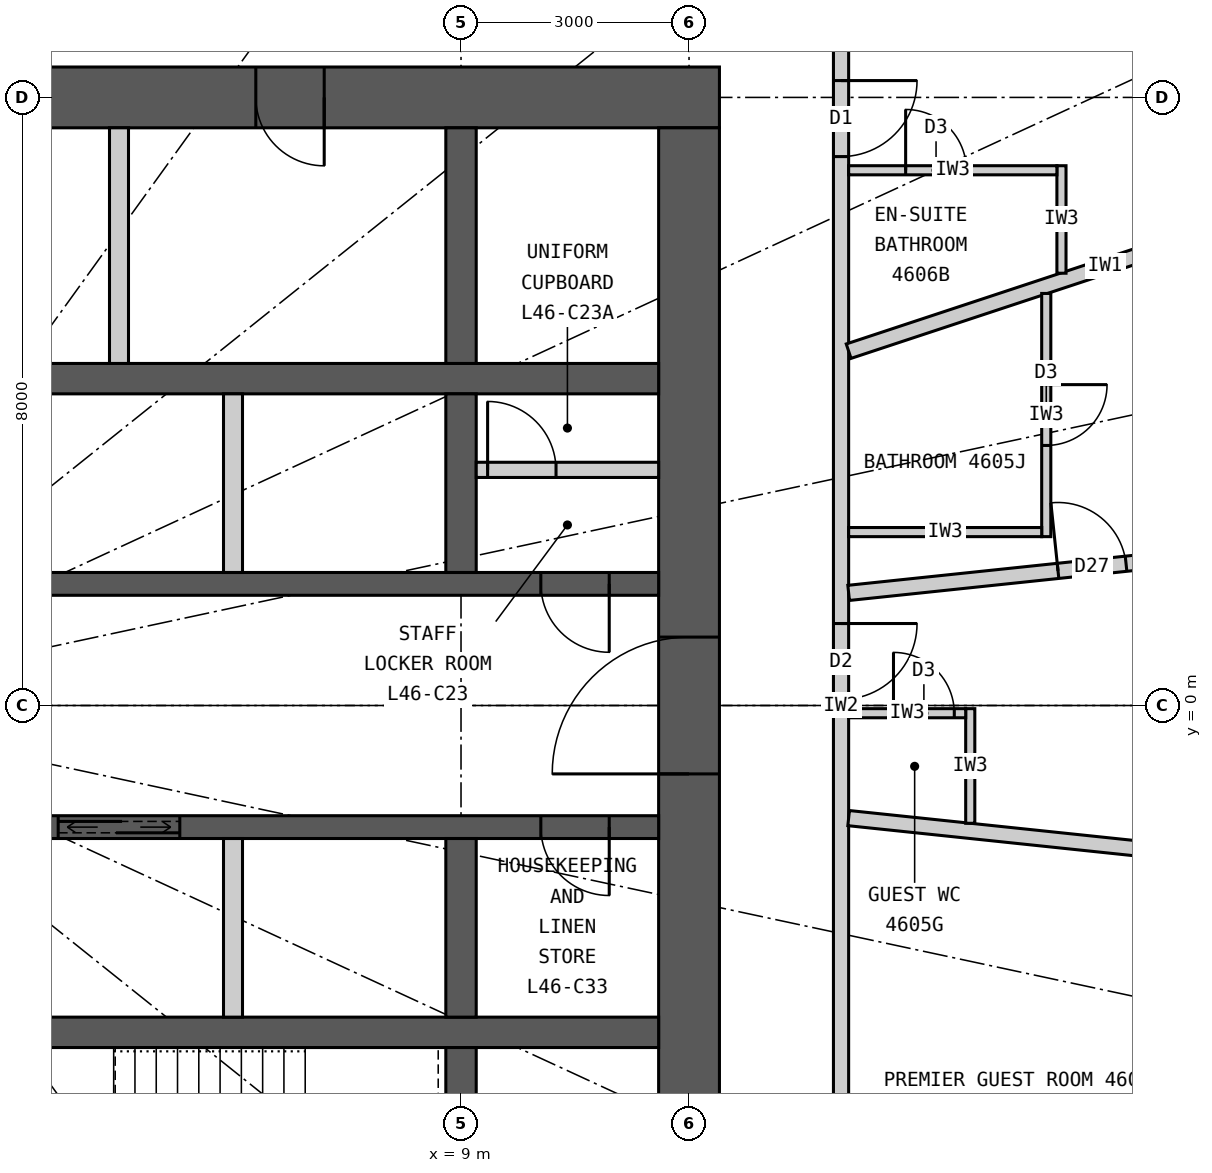
"""IFC4 building model, lengths in metres.
Left out: names, types, materials, properties, quantities, classifications, styles, units other than length and angle.
Written with IfcOpenShell. Run it as: python <this file> out.ifc"""

import sys

from ifc_helpers import new_model, si_unit, direction, frame, frame_2d, origin, place, context, subcontext, project, spatial, rectangle, extrude, element, fill, save


model = new_model("IFC4")
c1 = context("Model", 3, precision=1e-05, world=origin(), true_north=direction((0.0, 1.0)))
c2 = subcontext(c1, "Body", "Model", "MODEL_VIEW")
j1 = project(units=[si_unit("LENGTHUNIT", "METRE"), si_unit("PLANEANGLEUNIT", "RADIAN")], contexts=[c1])
p1 = place(None, origin())
s1 = spatial("IfcSite", under=j1, at=p1, CompositionType="ELEMENT")
p2 = place(p1, origin())
s2 = spatial("IfcBuilding", under=s1, at=p2, CompositionType="ELEMENT")
p3 = place(p2, frame((0.0, 0.0, 173.1)))
s3 = spatial("IfcBuildingStorey", under=s2, at=p3, CompositionType="ELEMENT", Elevation=173.1)
p4 = place(p3, frame((-12.4, 8.0, 0.0), z_axis=(0.0, 0.0, 1.0), x_axis=(1.0, 0.0, 0.0)))
e1 = element("IfcWall", 1, at=p4, inside=s3, PredefinedType="SHEAR", context=c2, shape_type="SweptSolid", body=[
    extrude(rectangle(XDim=24.8, YDim=0.8, at=frame_2d((12.4, 0.0))), origin(), (0.0, 0.0, 1.0), 3.3),
])
p5 = place(p4, frame((11.1, 0.0, 0.0)))
e2 = element("IfcOpeningElement", 2, at=p5, cuts=e1, PredefinedType="OPENING", context=c2, shape_type="SweptSolid", body=[
    extrude(rectangle(XDim=1.2, YDim=2.2, at=frame_2d((0.6, 1.1))), frame((0.0, 0.41, 0.0), z_axis=(0.0, -1.0, 0.0), x_axis=(1.0, 0.0, 0.0)), (0.0, 0.0, 1.0), 0.82),
])
p6 = place(p4, frame((18.7, 0.0, 0.0)))
e3 = element("IfcOpeningElement", 3, at=p6, cuts=e1, PredefinedType="OPENING", context=c2, shape_type="SweptSolid", body=[
    extrude(rectangle(XDim=0.9, YDim=2.2, at=frame_2d((0.45, 1.1))), frame((0.0, 0.41, 0.0), z_axis=(0.0, -1.0, 0.0), x_axis=(1.0, 0.0, 0.0)), (0.0, 0.0, 1.0), 0.82),
])
p7 = place(p3, frame((12.0, -7.6, 0.0), z_axis=(0.0, 0.0, 1.0), x_axis=(0.0, 1.0, 0.0)))
e4 = element("IfcWall", 4, at=p7, inside=s3, PredefinedType="SHEAR", context=c2, shape_type="SweptSolid", body=[
    extrude(rectangle(XDim=15.2, YDim=0.8, at=frame_2d((7.6, 0.0))), origin(), (0.0, 0.0, 1.0), 3.3),
])
p8 = place(p7, frame((6.7, 0.0, 0.0)))
e5 = element("IfcOpeningElement", 5, at=p8, cuts=e4, PredefinedType="OPENING", context=c2, shape_type="SweptSolid", body=[
    extrude(rectangle(XDim=1.8, YDim=2.2, at=frame_2d((0.9, 1.1))), frame((0.0, 0.41, 0.0), z_axis=(0.0, -1.0, 0.0), x_axis=(1.0, 0.0, 0.0)), (0.0, 0.0, 1.0), 0.82),
])
p9 = place(p3, frame((-11.6, 4.3, 0.0), z_axis=(0.0, 0.0, 1.0), x_axis=(1.0, 0.0, 0.0)))
e6 = element("IfcWall", 6, at=p9, inside=s3, PredefinedType="SHEAR", context=c2, shape_type="SweptSolid", body=[
    extrude(rectangle(XDim=23.2, YDim=0.4, at=frame_2d((11.6, 0.0))), origin(), (0.0, 0.0, 1.0), 3.3),
])
p10 = place(p3, frame((-11.6, 1.6, 0.0), z_axis=(0.0, 0.0, 1.0), x_axis=(1.0, 0.0, 0.0)))
e7 = element("IfcWall", 7, at=p10, inside=s3, PredefinedType="SHEAR", context=c2, shape_type="SweptSolid", body=[
    extrude(rectangle(XDim=23.2, YDim=0.3, at=frame_2d((11.6, 0.0))), origin(), (0.0, 0.0, 1.0), 3.3),
])
p11 = place(p10, frame((9.55, 0.0, 0.0)))
e8 = element("IfcOpeningElement", 8, at=p11, cuts=e7, PredefinedType="OPENING", context=c2, shape_type="SweptSolid", body=[
    extrude(rectangle(XDim=1.1, YDim=2.2, at=frame_2d((0.55, 1.1))), frame((0.0, 0.16, 0.0), z_axis=(0.0, -1.0, 0.0), x_axis=(1.0, 0.0, 0.0)), (0.0, 0.0, 1.0), 0.32),
])
p12 = place(p10, frame((12.55, 0.0, 0.0)))
e9 = element("IfcOpeningElement", 9, at=p12, cuts=e7, PredefinedType="OPENING", context=c2, shape_type="SweptSolid", body=[
    extrude(rectangle(XDim=1.1, YDim=2.2, at=frame_2d((0.55, 1.1))), frame((0.0, 0.16, 0.0), z_axis=(0.0, -1.0, 0.0), x_axis=(1.0, 0.0, 0.0)), (0.0, 0.0, 1.0), 0.32),
])
p13 = place(p10, frame((0.65, 0.0, 0.0)))
e10 = element("IfcOpeningElement", 10, at=p13, cuts=e7, PredefinedType="OPENING", context=c2, shape_type="SweptSolid", body=[
    extrude(rectangle(XDim=0.9, YDim=2.2, at=frame_2d((0.45, 1.1))), frame((0.0, 0.16, 0.0), z_axis=(0.0, -1.0, 0.0), x_axis=(1.0, 0.0, 0.0)), (0.0, 0.0, 1.0), 0.32),
])
p14 = place(p10, frame((5.15, 0.0, 0.0)))
e11 = element("IfcOpeningElement", 11, at=p14, cuts=e7, PredefinedType="OPENING", context=c2, shape_type="SweptSolid", body=[
    extrude(rectangle(XDim=0.9, YDim=2.2, at=frame_2d((0.45, 1.1))), frame((0.0, 0.16, 0.0), z_axis=(0.0, -1.0, 0.0), x_axis=(1.0, 0.0, 0.0)), (0.0, 0.0, 1.0), 0.32),
])
p15 = place(p10, frame((21.65, 0.0, 0.0)))
e12 = element("IfcOpeningElement", 12, at=p15, cuts=e7, PredefinedType="OPENING", context=c2, shape_type="SweptSolid", body=[
    extrude(rectangle(XDim=0.9, YDim=2.2, at=frame_2d((0.45, 1.1))), frame((0.0, 0.16, 0.0), z_axis=(0.0, -1.0, 0.0), x_axis=(1.0, 0.0, 0.0)), (0.0, 0.0, 1.0), 0.32),
])
p16 = place(p3, frame((-11.6, -4.3, 0.0), z_axis=(0.0, 0.0, 1.0), x_axis=(1.0, 0.0, 0.0)))
e13 = element("IfcWall", 13, at=p16, inside=s3, PredefinedType="SHEAR", context=c2, shape_type="SweptSolid", body=[
    extrude(rectangle(XDim=23.2, YDim=0.4, at=frame_2d((11.6, 0.0))), origin(), (0.0, 0.0, 1.0), 3.3),
])
p17 = place(p3, frame((-11.6, -1.6, 0.0), z_axis=(0.0, 0.0, 1.0), x_axis=(1.0, 0.0, 0.0)))
e14 = element("IfcWall", 14, at=p17, inside=s3, PredefinedType="SHEAR", context=c2, shape_type="SweptSolid", body=[
    extrude(rectangle(XDim=23.2, YDim=0.3, at=frame_2d((11.6, 0.0))), origin(), (0.0, 0.0, 1.0), 3.3),
])
p18 = place(p17, frame((9.55, 0.0, 0.0)))
e15 = element("IfcOpeningElement", 15, at=p18, cuts=e14, PredefinedType="OPENING", context=c2, shape_type="SweptSolid", body=[
    extrude(rectangle(XDim=1.1, YDim=2.2, at=frame_2d((0.55, 1.1))), frame((0.0, 0.16, 0.0), z_axis=(0.0, -1.0, 0.0), x_axis=(1.0, 0.0, 0.0)), (0.0, 0.0, 1.0), 0.32),
])
p19 = place(p17, frame((15.3, 0.0, 0.0)))
e16 = element("IfcOpeningElement", 16, at=p19, cuts=e14, PredefinedType="OPENING", context=c2, shape_type="SweptSolid", body=[
    extrude(rectangle(XDim=1.6, YDim=2.4, at=frame_2d((0.8, 1.2))), frame((0.0, 0.16, 0.0), z_axis=(0.0, -1.0, 0.0), x_axis=(1.0, 0.0, 0.0)), (0.0, 0.0, 1.0), 0.32),
])
p20 = place(p17, frame((0.65, 0.0, 0.0)))
e17 = element("IfcOpeningElement", 17, at=p20, cuts=e14, PredefinedType="OPENING", context=c2, shape_type="SweptSolid", body=[
    extrude(rectangle(XDim=0.9, YDim=2.2, at=frame_2d((0.45, 1.1))), frame((0.0, 0.16, 0.0), z_axis=(0.0, -1.0, 0.0), x_axis=(1.0, 0.0, 0.0)), (0.0, 0.0, 1.0), 0.32),
])
p21 = place(p17, frame((5.15, 0.0, 0.0)))
e18 = element("IfcOpeningElement", 18, at=p21, cuts=e14, PredefinedType="OPENING", context=c2, shape_type="SweptSolid", body=[
    extrude(rectangle(XDim=0.9, YDim=2.2, at=frame_2d((0.45, 1.1))), frame((0.0, 0.16, 0.0), z_axis=(0.0, -1.0, 0.0), x_axis=(1.0, 0.0, 0.0)), (0.0, 0.0, 1.0), 0.32),
])
p22 = place(p17, frame((21.65, 0.0, 0.0)))
e19 = element("IfcOpeningElement", 19, at=p22, cuts=e14, PredefinedType="OPENING", context=c2, shape_type="SweptSolid", body=[
    extrude(rectangle(XDim=0.9, YDim=2.2, at=frame_2d((0.45, 1.1))), frame((0.0, 0.16, 0.0), z_axis=(0.0, -1.0, 0.0), x_axis=(1.0, 0.0, 0.0)), (0.0, 0.0, 1.0), 0.32),
])
p23 = place(p3, frame((9.0, 4.5, 0.0), z_axis=(0.0, 0.0, 1.0), x_axis=(0.0, 1.0, 0.0)))
e20 = element("IfcWall", 20, at=p23, inside=s3, PredefinedType="SHEAR", context=c2, shape_type="SweptSolid", body=[
    extrude(rectangle(XDim=3.1, YDim=0.4, at=frame_2d((1.55, 0.0))), origin(), (0.0, 0.0, 1.0), 3.3),
])
for number, where, z_axis, x_axis in (
    (21, (9.0, 1.75, 0.0), (0.0, 0.0, 1.0), (0.0, 1.0, 0.0)),
    (22, (9.0, -4.1, 0.0), (0.0, 0.0, 1.0), (0.0, 1.0, 0.0)),
):
    element("IfcWall", number, at=place(p3, frame(where, z_axis=z_axis, x_axis=x_axis)), inside=s3, PredefinedType="SHEAR", context=c2, shape_type="SweptSolid", body=[
        extrude(rectangle(XDim=2.35, YDim=0.4, at=frame_2d((1.175, 0.0))), origin(), (0.0, 0.0, 1.0), 3.3),
    ])
p24 = place(p3, frame((9.0, -7.6, 0.0), z_axis=(0.0, 0.0, 1.0), x_axis=(0.0, 1.0, 0.0)))
e23 = element("IfcWall", 23, at=p24, inside=s3, PredefinedType="SHEAR", context=c2, shape_type="SweptSolid", body=[
    extrude(rectangle(XDim=3.1, YDim=0.4, at=frame_2d((1.55, 0.0))), origin(), (0.0, 0.0, 1.0), 3.3),
])
p25 = place(p3, frame((4.5, 4.5, 0.0), z_axis=(0.0, 0.0, 1.0), x_axis=(0.0, 1.0, 0.0)))
e24 = element("IfcWall", 24, at=p25, inside=s3, PredefinedType="PARTITIONING", context=c2, shape_type="SweptSolid", body=[
    extrude(rectangle(XDim=3.1, YDim=0.25, at=frame_2d((1.55, 0.0))), origin(), (0.0, 0.0, 1.0), 3.3),
])
for number, where, z_axis, x_axis in (
    (25, (6.0, 1.75, 0.0), (0.0, 0.0, 1.0), (0.0, 1.0, 0.0)),
    (26, (6.0, -4.1, 0.0), (0.0, 0.0, 1.0), (0.0, 1.0, 0.0)),
):
    element("IfcWall", number, at=place(p3, frame(where, z_axis=z_axis, x_axis=x_axis)), inside=s3, PredefinedType="PARTITIONING", context=c2, shape_type="SweptSolid", body=[
        extrude(rectangle(XDim=2.35, YDim=0.25, at=frame_2d((1.175, 0.0))), origin(), (0.0, 0.0, 1.0), 3.3),
    ])
p26 = place(p3, frame((14.0, -9.9, 0.0), z_axis=(0.0, 0.0, 1.0), x_axis=(0.0, 1.0, 0.0)))
e27 = element("IfcWall", 27, at=p26, inside=s3, PredefinedType="PARTITIONING", context=c2, shape_type="SweptSolid", body=[
    extrude(rectangle(XDim=19.8, YDim=0.2, at=frame_2d((9.9, 0.0))), origin(), (0.0, 0.0, 1.0), 3.12),
])
p27 = place(p26, frame((3.688, 0.0, 0.0)))
e28 = element("IfcOpeningElement", 28, at=p27, cuts=e27, PredefinedType="OPENING", context=c2, shape_type="SweptSolid", body=[
    extrude(rectangle(XDim=1.0, YDim=2.2, at=frame_2d((0.5, 1.1))), frame((0.0, 0.11, 0.0), z_axis=(0.0, -1.0, 0.0), x_axis=(1.0, 0.0, 0.0)), (0.0, 0.0, 1.0), 0.22),
])
p28 = place(p26, frame((9.979, 0.0, 0.0)))
e29 = element("IfcOpeningElement", 29, at=p28, cuts=e27, PredefinedType="OPENING", context=c2, shape_type="SweptSolid", body=[
    extrude(rectangle(XDim=1.0, YDim=2.2, at=frame_2d((0.5, 1.1))), frame((0.0, 0.11, 0.0), z_axis=(0.0, -1.0, 0.0), x_axis=(1.0, 0.0, 0.0)), (0.0, 0.0, 1.0), 0.22),
])
p29 = place(p26, frame((17.122, 0.0, 0.0)))
e30 = element("IfcOpeningElement", 30, at=p29, cuts=e27, PredefinedType="OPENING", context=c2, shape_type="SweptSolid", body=[
    extrude(rectangle(XDim=1.0, YDim=2.2, at=frame_2d((0.5, 1.1))), frame((0.0, 0.11, 0.0), z_axis=(0.0, -1.0, 0.0), x_axis=(1.0, 0.0, 0.0)), (0.0, 0.0, 1.0), 0.22),
])
p30 = place(p3, frame((14.1, 1.481, 0.0), z_axis=(0.0, 0.0, 1.0), x_axis=(0.994524794819, 0.104500873159, 0.0)))
e31 = element("IfcWall", 31, at=p30, inside=s3, PredefinedType="PARTITIONING", context=c2, shape_type="SweptSolid", body=[
    extrude(rectangle(XDim=8.362, YDim=0.2, at=frame_2d((4.181, 0.0))), origin(), (0.0, 0.0, 1.0), 2.47),
])
p31 = place(p30, frame((2.77, 0.0, 0.0)))
e32 = element("IfcOpeningElement", 32, at=p31, cuts=e31, PredefinedType="OPENING", context=c2, shape_type="SweptSolid", body=[
    extrude(rectangle(XDim=0.9, YDim=2.1, at=frame_2d((0.45, 1.05))), frame((0.0, 0.11, 0.0), z_axis=(0.0, -1.0, 0.0), x_axis=(1.0, 0.0, 0.0)), (0.0, 0.0, 1.0), 0.22),
])
p32 = place(p3, frame((14.1, 4.661, 0.0), z_axis=(0.0, 0.0, 1.0), x_axis=(0.949453216399, 0.313908569285, 0.0)))
e33 = element("IfcWall", 33, at=p32, inside=s3, PredefinedType="PARTITIONING", context=c2, shape_type="SweptSolid", body=[
    extrude(rectangle(XDim=7.109, YDim=0.2, at=frame_2d((3.554, 0.0))), origin(), (0.0, 0.0, 1.0), 3.12),
])
p33 = place(p3, frame((14.1, -1.481, 0.0), z_axis=(0.0, 0.0, 1.0), x_axis=(0.994524794819, -0.104500873159, 0.0)))
e34 = element("IfcWall", 34, at=p33, inside=s3, PredefinedType="PARTITIONING", context=c2, shape_type="SweptSolid", body=[
    extrude(rectangle(XDim=8.362, YDim=0.2, at=frame_2d((4.181, 0.0))), origin(), (0.0, 0.0, 1.0), 2.47),
])
p34 = place(p3, frame((15.7, -1.55, 0.0), z_axis=(0.0, 0.0, 1.0), x_axis=(0.0, 1.0, 0.0)))
e35 = element("IfcWall", 35, at=p34, inside=s3, PredefinedType="PARTITIONING", context=c2, shape_type="SweptSolid", body=[
    extrude(rectangle(XDim=1.508, YDim=0.12, at=frame_2d((0.754, 0.0))), origin(), (0.0, 0.0, 1.0), 3.12),
])
p35 = place(p3, frame((14.1, -0.102, 0.0), z_axis=(0.0, 0.0, 1.0), x_axis=(1.0, 0.0, 0.0)))
e36 = element("IfcWall", 36, at=p35, inside=s3, PredefinedType="PARTITIONING", context=c2, shape_type="SweptSolid", body=[
    extrude(rectangle(XDim=1.54, YDim=0.12, at=frame_2d((0.77, 0.0))), origin(), (0.0, 0.0, 1.0), 2.42),
])
p36 = place(p35, frame((0.59, 0.0, 0.0)))
e37 = element("IfcOpeningElement", 37, at=p36, cuts=e36, PredefinedType="OPENING", context=c2, shape_type="SweptSolid", body=[
    extrude(rectangle(XDim=0.8, YDim=2.1, at=frame_2d((0.4, 1.05))), frame((0.0, 0.07, 0.0), z_axis=(0.0, -1.0, 0.0), x_axis=(1.0, 0.0, 0.0)), (0.0, 0.0, 1.0), 0.14),
])
p37 = place(p3, frame((16.7, 5.421, 0.0), z_axis=(0.0, 0.0, 1.0), x_axis=(0.0, -1.0, 0.0)))
e38 = element("IfcWall", 38, at=p37, inside=s3, PredefinedType="PARTITIONING", context=c2, shape_type="SweptSolid", body=[
    extrude(rectangle(XDim=3.2, YDim=0.12, at=frame_2d((1.6, 0.0))), origin(), (0.0, 0.0, 1.0), 3.12),
])
p38 = place(p37, frame((1.2, 0.0, 0.0)))
e39 = element("IfcOpeningElement", 39, at=p38, cuts=e38, PredefinedType="OPENING", context=c2, shape_type="SweptSolid", body=[
    extrude(rectangle(XDim=0.8, YDim=2.1, at=frame_2d((0.4, 1.05))), frame((0.0, 0.07, 0.0), z_axis=(0.0, -1.0, 0.0), x_axis=(1.0, 0.0, 0.0)), (0.0, 0.0, 1.0), 0.14),
])
p39 = place(p3, frame((14.1, 2.281, 0.0), z_axis=(0.0, 0.0, 1.0), x_axis=(1.0, 0.0, 0.0)))
e40 = element("IfcWall", 40, at=p39, inside=s3, PredefinedType="PARTITIONING", context=c2, shape_type="SweptSolid", body=[
    extrude(rectangle(XDim=2.54, YDim=0.12, at=frame_2d((1.27, 0.0))), origin(), (0.0, 0.0, 1.0), 3.12),
])
p40 = place(p3, frame((16.9, 5.687, 0.0), z_axis=(0.0, 0.0, 1.0), x_axis=(0.0, 1.0, 0.0)))
e41 = element("IfcWall", 41, at=p40, inside=s3, PredefinedType="PARTITIONING", context=c2, shape_type="SweptSolid", body=[
    extrude(rectangle(XDim=1.414, YDim=0.12, at=frame_2d((0.707, 0.0))), origin(), (0.0, 0.0, 1.0), 3.12),
])
p41 = place(p3, frame((14.1, 7.042, 0.0), z_axis=(0.0, 0.0, 1.0), x_axis=(1.0, 0.0, 0.0)))
e42 = element("IfcWall", 42, at=p41, inside=s3, PredefinedType="PARTITIONING", context=c2, shape_type="SweptSolid", body=[
    extrude(rectangle(XDim=2.74, YDim=0.12, at=frame_2d((1.37, 0.0))), origin(), (0.0, 0.0, 1.0), 3.12),
])
p42 = place(p41, frame((0.75, 0.0, 0.0)))
e43 = element("IfcOpeningElement", 43, at=p42, cuts=e42, PredefinedType="OPENING", context=c2, shape_type="SweptSolid", body=[
    extrude(rectangle(XDim=0.8, YDim=2.1, at=frame_2d((0.4, 1.05))), frame((0.0, 0.07, 0.0), z_axis=(0.0, -1.0, 0.0), x_axis=(1.0, 0.0, 0.0)), (0.0, 0.0, 1.0), 0.14),
])
p43 = place(p3, frame((9.2, 3.1, 0.0), z_axis=(0.0, 0.0, 1.0), x_axis=(1.0, 0.0, 0.0)))
e44 = element("IfcWall", 44, at=p43, inside=s3, PredefinedType="PARTITIONING", context=c2, shape_type="SweptSolid", body=[
    extrude(rectangle(XDim=2.4, YDim=0.2, at=frame_2d((1.2, 0.0))), origin(), (0.0, 0.0, 1.0), 3.12),
])
p44 = place(p43, frame((0.15, 0.0, 0.0)))
e45 = element("IfcOpeningElement", 45, at=p44, cuts=e44, PredefinedType="OPENING", context=c2, shape_type="SweptSolid", body=[
    extrude(rectangle(XDim=0.9, YDim=2.2, at=frame_2d((0.45, 1.1))), frame((0.0, 0.11, 0.0), z_axis=(0.0, -1.0, 0.0), x_axis=(1.0, 0.0, 0.0)), (0.0, 0.0, 1.0), 0.22),
])
p45 = place(p36, origin())
e46 = element("IfcDoor", 46, at=p45, inside=s3, OperationType="SINGLE_SWING_LEFT", PredefinedType="DOOR", context=c2, shape_type="SweptSolid", body=[
    extrude(rectangle(XDim=0.8, YDim=2.1, at=frame_2d((0.4, 1.05))), frame((0.0, 0.025, 0.0), z_axis=(0.0, -1.0, 0.0), x_axis=(1.0, 0.0, 0.0)), (0.0, 0.0, 1.0), 0.05),
])
fill(e37, e46)
p46 = place(p28, origin())
e47 = element("IfcDoor", 47, at=p46, inside=s3, OperationType="SINGLE_SWING_RIGHT", PredefinedType="DOOR", context=c2, shape_type="SweptSolid", body=[
    extrude(rectangle(XDim=1.0, YDim=2.2, at=frame_2d((0.5, 1.1))), frame((0.0, 0.025, 0.0), z_axis=(0.0, -1.0, 0.0), x_axis=(1.0, 0.0, 0.0)), (0.0, 0.0, 1.0), 0.05),
])
fill(e29, e47)
p47 = place(p38, origin())
e48 = element("IfcDoor", 48, at=p47, inside=s3, OperationType="SINGLE_SWING_LEFT", PredefinedType="DOOR", context=c2, shape_type="SweptSolid", body=[
    extrude(rectangle(XDim=0.8, YDim=2.1, at=frame_2d((0.4, 1.05))), frame((0.0, 0.025, 0.0), z_axis=(0.0, -1.0, 0.0), x_axis=(1.0, 0.0, 0.0)), (0.0, 0.0, 1.0), 0.05),
])
fill(e39, e48)
p48 = place(p31, origin())
e49 = element("IfcDoor", 49, at=p48, inside=s3, OperationType="SINGLE_SWING_LEFT", PredefinedType="DOOR", context=c2, shape_type="SweptSolid", body=[
    extrude(rectangle(XDim=0.9, YDim=2.1, at=frame_2d((0.45, 1.05))), frame((0.0, 0.025, 0.0), z_axis=(0.0, -1.0, 0.0), x_axis=(1.0, 0.0, 0.0)), (0.0, 0.0, 1.0), 0.05),
])
fill(e32, e49)
p49 = place(p42, origin())
e50 = element("IfcDoor", 50, at=p49, inside=s3, OperationType="SINGLE_SWING_LEFT", PredefinedType="DOOR", context=c2, shape_type="SweptSolid", body=[
    extrude(rectangle(XDim=0.8, YDim=2.1, at=frame_2d((0.4, 1.05))), frame((0.0, 0.025, 0.0), z_axis=(0.0, -1.0, 0.0), x_axis=(1.0, 0.0, 0.0)), (0.0, 0.0, 1.0), 0.05),
])
fill(e43, e50)
p50 = place(p29, origin())
e51 = element("IfcDoor", 51, at=p50, inside=s3, OperationType="SINGLE_SWING_RIGHT", PredefinedType="DOOR", context=c2, shape_type="SweptSolid", body=[
    extrude(rectangle(XDim=1.0, YDim=2.2, at=frame_2d((0.5, 1.1))), frame((0.0, 0.025, 0.0), z_axis=(0.0, -1.0, 0.0), x_axis=(1.0, 0.0, 0.0)), (0.0, 0.0, 1.0), 0.05),
])
fill(e30, e51)
p51 = place(p6, origin())
e52 = element("IfcDoor", 52, at=p51, inside=s3, OperationType="SINGLE_SWING_RIGHT", PredefinedType="DOOR", context=c2, shape_type="SweptSolid", body=[
    extrude(rectangle(XDim=0.9, YDim=2.2, at=frame_2d((0.45, 1.1))), frame((0.0, 0.025, 0.0), z_axis=(0.0, -1.0, 0.0), x_axis=(1.0, 0.0, 0.0)), (0.0, 0.0, 1.0), 0.05),
])
fill(e3, e52)
p52 = place(p19, origin())
e53 = element("IfcDoor", 53, at=p52, inside=s3, OperationType="DOUBLE_DOOR_SLIDING", PredefinedType="DOOR", context=c2, shape_type="SweptSolid", body=[
    extrude(rectangle(XDim=1.6, YDim=2.4, at=frame_2d((0.8, 1.2))), frame((0.0, 0.025, 0.0), z_axis=(0.0, -1.0, 0.0), x_axis=(1.0, 0.0, 0.0)), (0.0, 0.0, 1.0), 0.05),
])
fill(e16, e53)
p53 = place(p22, origin())
e54 = element("IfcDoor", 54, at=p53, inside=s3, OperationType="SINGLE_SWING_RIGHT", PredefinedType="DOOR", context=c2, shape_type="SweptSolid", body=[
    extrude(rectangle(XDim=0.9, YDim=2.2, at=frame_2d((0.45, 1.1))), frame((0.0, 0.025, 0.0), z_axis=(0.0, -1.0, 0.0), x_axis=(1.0, 0.0, 0.0)), (0.0, 0.0, 1.0), 0.05),
])
fill(e19, e54)
p54 = place(p15, origin())
e55 = element("IfcDoor", 55, at=p54, inside=s3, OperationType="SINGLE_SWING_RIGHT", PredefinedType="DOOR", context=c2, shape_type="SweptSolid", body=[
    extrude(rectangle(XDim=0.9, YDim=2.2, at=frame_2d((0.45, 1.1))), frame((0.0, 0.025, 0.0), z_axis=(0.0, -1.0, 0.0), x_axis=(1.0, 0.0, 0.0)), (0.0, 0.0, 1.0), 0.05),
])
fill(e12, e55)
p55 = place(p44, origin())
e56 = element("IfcDoor", 56, at=p55, inside=s3, OperationType="SINGLE_SWING_LEFT", PredefinedType="DOOR", context=c2, shape_type="SweptSolid", body=[
    extrude(rectangle(XDim=0.9, YDim=2.2, at=frame_2d((0.45, 1.1))), frame((0.0, 0.025, 0.0), z_axis=(0.0, -1.0, 0.0), x_axis=(1.0, 0.0, 0.0)), (0.0, 0.0, 1.0), 0.05),
])
fill(e45, e56)
p56 = place(p8, origin())
e57 = element("IfcDoor", 57, at=p56, inside=s3, OperationType="DOUBLE_DOOR_DOUBLE_SWING", PredefinedType="DOOR", context=c2, shape_type="SweptSolid", body=[
    extrude(rectangle(XDim=1.8, YDim=2.2, at=frame_2d((0.9, 1.1))), frame((0.0, 0.025, 0.0), z_axis=(0.0, -1.0, 0.0), x_axis=(1.0, 0.0, 0.0)), (0.0, 0.0, 1.0), 0.05),
])
fill(e5, e57)
save(model, sys.argv[1])
